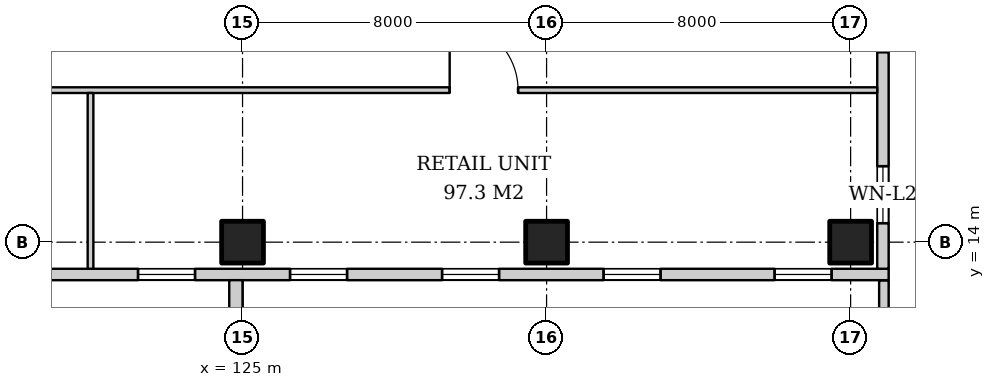
"""IFC4 building model, lengths in metres.
Left out: names, types, materials, properties, quantities, classifications, styles, units other than length and angle.
Written with IfcOpenShell. Run it as: python <this file> out.ifc"""

import sys

from ifc_helpers import new_model, si_unit, direction, frame, frame_2d, origin, origin_2d, place, context, subcontext, project, spatial, rectangle, extrude, element, fill, save


model = new_model("IFC4")
c1 = context("Model", 3, precision=1e-05, world=origin(), true_north=direction((0.0, 1.0)))
c2 = subcontext(c1, "Body", "Model", "MODEL_VIEW")
j1 = project(units=[si_unit("LENGTHUNIT", "METRE"), si_unit("PLANEANGLEUNIT", "RADIAN")], contexts=[c1])
p1 = place(None, origin())
s1 = spatial("IfcSite", under=j1, at=p1, CompositionType="ELEMENT")
p2 = place(p1, origin())
s2 = spatial("IfcBuilding", under=s1, at=p2, CompositionType="ELEMENT")
p3 = place(p2, frame((0.0, 0.0, 6.0)))
s3 = spatial("IfcBuildingStorey", under=s2, at=p3, CompositionType="ELEMENT", Elevation=6.0)
for number, where, z_axis, x_axis in (
    (1, (125.0, 14.0, 0.0), (0.0, 0.0, 1.0), (1.0, 0.0, 0.0)),
    (2, (133.0, 14.0, 0.0), (0.0, 0.0, 1.0), (1.0, 0.0, 0.0)),
    (3, (141.0, 14.0, 0.0), (0.0, 0.0, 1.0), (1.0, 0.0, 0.0)),
):
    element("IfcColumn", number, at=place(p3, frame(where, z_axis=z_axis, x_axis=x_axis)), inside=s3, PredefinedType="COLUMN", context=c2, shape_type="SweptSolid", body=[
        extrude(rectangle(XDim=1.1, YDim=1.1, at=origin_2d()), origin(), (0.0, 0.0, 1.0), 5.0),
    ])
p4 = place(p3, frame((92.0, 13.15, 0.0), z_axis=(0.0, 0.0, 1.0), x_axis=(1.0, 0.0, 0.0)))
e4 = element("IfcWall", 4, at=p4, inside=s3, PredefinedType="SOLIDWALL", context=c2, shape_type="SweptSolid", body=[
    extrude(rectangle(XDim=50.0, YDim=0.3, at=frame_2d((25.0, 0.0))), origin(), (0.0, 0.0, 1.0), 4.7),
])
p5 = place(p4, frame((1.5, 0.0, 0.9)))
e5 = element("IfcOpeningElement", 5, at=p5, cuts=e4, PredefinedType="OPENING", context=c2, shape_type="SweptSolid", body=[
    extrude(rectangle(XDim=1.5, YDim=3.2, at=frame_2d((0.75, 1.6))), frame((0.0, 0.16, 0.0), z_axis=(0.0, -1.0, 0.0), x_axis=(1.0, 0.0, 0.0)), (0.0, 0.0, 1.0), 0.32),
])
p6 = place(p4, frame((6.0, 0.0, 0.9)))
e6 = element("IfcOpeningElement", 6, at=p6, cuts=e4, PredefinedType="OPENING", context=c2, shape_type="SweptSolid", body=[
    extrude(rectangle(XDim=1.5, YDim=3.2, at=frame_2d((0.75, 1.6))), frame((0.0, 0.16, 0.0), z_axis=(0.0, -1.0, 0.0), x_axis=(1.0, 0.0, 0.0)), (0.0, 0.0, 1.0), 0.32),
])
p7 = place(p4, frame((10.25, 0.0, 0.9)))
e7 = element("IfcOpeningElement", 7, at=p7, cuts=e4, PredefinedType="OPENING", context=c2, shape_type="SweptSolid", body=[
    extrude(rectangle(XDim=1.5, YDim=3.2, at=frame_2d((0.75, 1.6))), frame((0.0, 0.16, 0.0), z_axis=(0.0, -1.0, 0.0), x_axis=(1.0, 0.0, 0.0)), (0.0, 0.0, 1.0), 0.32),
])
p8 = place(p4, frame((14.25, 0.0, 0.9)))
e8 = element("IfcOpeningElement", 8, at=p8, cuts=e4, PredefinedType="OPENING", context=c2, shape_type="SweptSolid", body=[
    extrude(rectangle(XDim=1.5, YDim=3.2, at=frame_2d((0.75, 1.6))), frame((0.0, 0.16, 0.0), z_axis=(0.0, -1.0, 0.0), x_axis=(1.0, 0.0, 0.0)), (0.0, 0.0, 1.0), 0.32),
])
p9 = place(p4, frame((18.25, 0.0, 0.9)))
e9 = element("IfcOpeningElement", 9, at=p9, cuts=e4, PredefinedType="OPENING", context=c2, shape_type="SweptSolid", body=[
    extrude(rectangle(XDim=1.5, YDim=3.2, at=frame_2d((0.75, 1.6))), frame((0.0, 0.16, 0.0), z_axis=(0.0, -1.0, 0.0), x_axis=(1.0, 0.0, 0.0)), (0.0, 0.0, 1.0), 0.32),
])
p10 = place(p4, frame((22.25, 0.0, 0.9)))
e10 = element("IfcOpeningElement", 10, at=p10, cuts=e4, PredefinedType="OPENING", context=c2, shape_type="SweptSolid", body=[
    extrude(rectangle(XDim=1.5, YDim=3.2, at=frame_2d((0.75, 1.6))), frame((0.0, 0.16, 0.0), z_axis=(0.0, -1.0, 0.0), x_axis=(1.0, 0.0, 0.0)), (0.0, 0.0, 1.0), 0.32),
])
p11 = place(p4, frame((26.1, 0.0, 0.0)))
e11 = element("IfcOpeningElement", 11, at=p11, cuts=e4, PredefinedType="OPENING", context=c2, shape_type="SweptSolid", body=[
    extrude(rectangle(XDim=1.8, YDim=2.4, at=frame_2d((0.9, 1.2))), frame((0.0, 0.16, 0.0), z_axis=(0.0, -1.0, 0.0), x_axis=(1.0, 0.0, 0.0)), (0.0, 0.0, 1.0), 0.32),
])
p12 = place(p4, frame((30.25, 0.0, 0.9)))
e12 = element("IfcOpeningElement", 12, at=p12, cuts=e4, PredefinedType="OPENING", context=c2, shape_type="SweptSolid", body=[
    extrude(rectangle(XDim=1.5, YDim=3.2, at=frame_2d((0.75, 1.6))), frame((0.0, 0.16, 0.0), z_axis=(0.0, -1.0, 0.0), x_axis=(1.0, 0.0, 0.0)), (0.0, 0.0, 1.0), 0.32),
])
p13 = place(p4, frame((34.25, 0.0, 0.9)))
e13 = element("IfcOpeningElement", 13, at=p13, cuts=e4, PredefinedType="OPENING", context=c2, shape_type="SweptSolid", body=[
    extrude(rectangle(XDim=1.5, YDim=3.2, at=frame_2d((0.75, 1.6))), frame((0.0, 0.16, 0.0), z_axis=(0.0, -1.0, 0.0), x_axis=(1.0, 0.0, 0.0)), (0.0, 0.0, 1.0), 0.32),
])
p14 = place(p4, frame((38.25, 0.0, 0.9)))
e14 = element("IfcOpeningElement", 14, at=p14, cuts=e4, PredefinedType="OPENING", context=c2, shape_type="SweptSolid", body=[
    extrude(rectangle(XDim=1.5, YDim=3.2, at=frame_2d((0.75, 1.6))), frame((0.0, 0.16, 0.0), z_axis=(0.0, -1.0, 0.0), x_axis=(1.0, 0.0, 0.0)), (0.0, 0.0, 1.0), 0.32),
])
p15 = place(p4, frame((42.5, 0.0, 0.9)))
e15 = element("IfcOpeningElement", 15, at=p15, cuts=e4, PredefinedType="OPENING", context=c2, shape_type="SweptSolid", body=[
    extrude(rectangle(XDim=1.5, YDim=3.2, at=frame_2d((0.75, 1.6))), frame((0.0, 0.16, 0.0), z_axis=(0.0, -1.0, 0.0), x_axis=(1.0, 0.0, 0.0)), (0.0, 0.0, 1.0), 0.32),
])
p16 = place(p4, frame((47.0, 0.0, 0.9)))
e16 = element("IfcOpeningElement", 16, at=p16, cuts=e4, PredefinedType="OPENING", context=c2, shape_type="SweptSolid", body=[
    extrude(rectangle(XDim=1.5, YDim=3.2, at=frame_2d((0.75, 1.6))), frame((0.0, 0.16, 0.0), z_axis=(0.0, -1.0, 0.0), x_axis=(1.0, 0.0, 0.0)), (0.0, 0.0, 1.0), 0.32),
])
p17 = place(p3, frame((141.85, 13.3, 0.0), z_axis=(0.0, 0.0, 1.0), x_axis=(0.0, 1.0, 0.0)))
e17 = element("IfcWall", 17, at=p17, inside=s3, PredefinedType="SOLIDWALL", context=c2, shape_type="SweptSolid", body=[
    extrude(rectangle(XDim=73.4, YDim=0.3, at=frame_2d((36.7, 0.0))), origin(), (0.0, 0.0, 1.0), 4.7),
])
p18 = place(p17, frame((1.2, 0.0, 0.9)))
e18 = element("IfcOpeningElement", 18, at=p18, cuts=e17, PredefinedType="OPENING", context=c2, shape_type="SweptSolid", body=[
    extrude(rectangle(XDim=1.5, YDim=3.2, at=frame_2d((0.75, 1.6))), frame((0.0, 0.16, 0.0), z_axis=(0.0, -1.0, 0.0), x_axis=(1.0, 0.0, 0.0)), (0.0, 0.0, 1.0), 0.32),
])
p19 = place(p17, frame((5.7, 0.0, 0.9)))
e19 = element("IfcOpeningElement", 19, at=p19, cuts=e17, PredefinedType="OPENING", context=c2, shape_type="SweptSolid", body=[
    extrude(rectangle(XDim=1.5, YDim=3.2, at=frame_2d((0.75, 1.6))), frame((0.0, 0.16, 0.0), z_axis=(0.0, -1.0, 0.0), x_axis=(1.0, 0.0, 0.0)), (0.0, 0.0, 1.0), 0.32),
])
p20 = place(p17, frame((9.95, 0.0, 0.9)))
e20 = element("IfcOpeningElement", 20, at=p20, cuts=e17, PredefinedType="OPENING", context=c2, shape_type="SweptSolid", body=[
    extrude(rectangle(XDim=1.5, YDim=3.2, at=frame_2d((0.75, 1.6))), frame((0.0, 0.16, 0.0), z_axis=(0.0, -1.0, 0.0), x_axis=(1.0, 0.0, 0.0)), (0.0, 0.0, 1.0), 0.32),
])
p21 = place(p17, frame((13.95, 0.0, 0.9)))
e21 = element("IfcOpeningElement", 21, at=p21, cuts=e17, PredefinedType="OPENING", context=c2, shape_type="SweptSolid", body=[
    extrude(rectangle(XDim=1.5, YDim=3.2, at=frame_2d((0.75, 1.6))), frame((0.0, 0.16, 0.0), z_axis=(0.0, -1.0, 0.0), x_axis=(1.0, 0.0, 0.0)), (0.0, 0.0, 1.0), 0.32),
])
p22 = place(p17, frame((17.95, 0.0, 0.9)))
e22 = element("IfcOpeningElement", 22, at=p22, cuts=e17, PredefinedType="OPENING", context=c2, shape_type="SweptSolid", body=[
    extrude(rectangle(XDim=1.5, YDim=3.2, at=frame_2d((0.75, 1.6))), frame((0.0, 0.16, 0.0), z_axis=(0.0, -1.0, 0.0), x_axis=(1.0, 0.0, 0.0)), (0.0, 0.0, 1.0), 0.32),
])
p23 = place(p17, frame((21.95, 0.0, 0.9)))
e23 = element("IfcOpeningElement", 23, at=p23, cuts=e17, PredefinedType="OPENING", context=c2, shape_type="SweptSolid", body=[
    extrude(rectangle(XDim=1.5, YDim=3.2, at=frame_2d((0.75, 1.6))), frame((0.0, 0.16, 0.0), z_axis=(0.0, -1.0, 0.0), x_axis=(1.0, 0.0, 0.0)), (0.0, 0.0, 1.0), 0.32),
])
p24 = place(p17, frame((25.95, 0.0, 0.9)))
e24 = element("IfcOpeningElement", 24, at=p24, cuts=e17, PredefinedType="OPENING", context=c2, shape_type="SweptSolid", body=[
    extrude(rectangle(XDim=1.5, YDim=3.2, at=frame_2d((0.75, 1.6))), frame((0.0, 0.16, 0.0), z_axis=(0.0, -1.0, 0.0), x_axis=(1.0, 0.0, 0.0)), (0.0, 0.0, 1.0), 0.32),
])
p25 = place(p17, frame((29.95, 0.0, 0.9)))
e25 = element("IfcOpeningElement", 25, at=p25, cuts=e17, PredefinedType="OPENING", context=c2, shape_type="SweptSolid", body=[
    extrude(rectangle(XDim=1.5, YDim=3.2, at=frame_2d((0.75, 1.6))), frame((0.0, 0.16, 0.0), z_axis=(0.0, -1.0, 0.0), x_axis=(1.0, 0.0, 0.0)), (0.0, 0.0, 1.0), 0.32),
])
p26 = place(p17, frame((33.95, 0.0, 0.9)))
e26 = element("IfcOpeningElement", 26, at=p26, cuts=e17, PredefinedType="OPENING", context=c2, shape_type="SweptSolid", body=[
    extrude(rectangle(XDim=1.5, YDim=3.2, at=frame_2d((0.75, 1.6))), frame((0.0, 0.16, 0.0), z_axis=(0.0, -1.0, 0.0), x_axis=(1.0, 0.0, 0.0)), (0.0, 0.0, 1.0), 0.32),
])
p27 = place(p17, frame((37.95, 0.0, 0.9)))
e27 = element("IfcOpeningElement", 27, at=p27, cuts=e17, PredefinedType="OPENING", context=c2, shape_type="SweptSolid", body=[
    extrude(rectangle(XDim=1.5, YDim=3.2, at=frame_2d((0.75, 1.6))), frame((0.0, 0.16, 0.0), z_axis=(0.0, -1.0, 0.0), x_axis=(1.0, 0.0, 0.0)), (0.0, 0.0, 1.0), 0.32),
])
p28 = place(p17, frame((41.95, 0.0, 0.9)))
e28 = element("IfcOpeningElement", 28, at=p28, cuts=e17, PredefinedType="OPENING", context=c2, shape_type="SweptSolid", body=[
    extrude(rectangle(XDim=1.5, YDim=3.2, at=frame_2d((0.75, 1.6))), frame((0.0, 0.16, 0.0), z_axis=(0.0, -1.0, 0.0), x_axis=(1.0, 0.0, 0.0)), (0.0, 0.0, 1.0), 0.32),
])
p29 = place(p17, frame((45.95, 0.0, 0.9)))
e29 = element("IfcOpeningElement", 29, at=p29, cuts=e17, PredefinedType="OPENING", context=c2, shape_type="SweptSolid", body=[
    extrude(rectangle(XDim=1.5, YDim=3.2, at=frame_2d((0.75, 1.6))), frame((0.0, 0.16, 0.0), z_axis=(0.0, -1.0, 0.0), x_axis=(1.0, 0.0, 0.0)), (0.0, 0.0, 1.0), 0.32),
])
p30 = place(p17, frame((49.95, 0.0, 0.9)))
e30 = element("IfcOpeningElement", 30, at=p30, cuts=e17, PredefinedType="OPENING", context=c2, shape_type="SweptSolid", body=[
    extrude(rectangle(XDim=1.5, YDim=3.2, at=frame_2d((0.75, 1.6))), frame((0.0, 0.16, 0.0), z_axis=(0.0, -1.0, 0.0), x_axis=(1.0, 0.0, 0.0)), (0.0, 0.0, 1.0), 0.32),
])
p31 = place(p17, frame((53.95, 0.0, 0.9)))
e31 = element("IfcOpeningElement", 31, at=p31, cuts=e17, PredefinedType="OPENING", context=c2, shape_type="SweptSolid", body=[
    extrude(rectangle(XDim=1.5, YDim=3.2, at=frame_2d((0.75, 1.6))), frame((0.0, 0.16, 0.0), z_axis=(0.0, -1.0, 0.0), x_axis=(1.0, 0.0, 0.0)), (0.0, 0.0, 1.0), 0.32),
])
p32 = place(p17, frame((57.95, 0.0, 0.9)))
e32 = element("IfcOpeningElement", 32, at=p32, cuts=e17, PredefinedType="OPENING", context=c2, shape_type="SweptSolid", body=[
    extrude(rectangle(XDim=1.5, YDim=3.2, at=frame_2d((0.75, 1.6))), frame((0.0, 0.16, 0.0), z_axis=(0.0, -1.0, 0.0), x_axis=(1.0, 0.0, 0.0)), (0.0, 0.0, 1.0), 0.32),
])
p33 = place(p17, frame((61.95, 0.0, 0.9)))
e33 = element("IfcOpeningElement", 33, at=p33, cuts=e17, PredefinedType="OPENING", context=c2, shape_type="SweptSolid", body=[
    extrude(rectangle(XDim=1.5, YDim=3.2, at=frame_2d((0.75, 1.6))), frame((0.0, 0.16, 0.0), z_axis=(0.0, -1.0, 0.0), x_axis=(1.0, 0.0, 0.0)), (0.0, 0.0, 1.0), 0.32),
])
p34 = place(p17, frame((66.2, 0.0, 0.9)))
e34 = element("IfcOpeningElement", 34, at=p34, cuts=e17, PredefinedType="OPENING", context=c2, shape_type="SweptSolid", body=[
    extrude(rectangle(XDim=1.5, YDim=3.2, at=frame_2d((0.75, 1.6))), frame((0.0, 0.16, 0.0), z_axis=(0.0, -1.0, 0.0), x_axis=(1.0, 0.0, 0.0)), (0.0, 0.0, 1.0), 0.32),
])
p35 = place(p17, frame((70.7, 0.0, 0.9)))
e35 = element("IfcOpeningElement", 35, at=p35, cuts=e17, PredefinedType="OPENING", context=c2, shape_type="SweptSolid", body=[
    extrude(rectangle(XDim=1.5, YDim=3.2, at=frame_2d((0.75, 1.6))), frame((0.0, 0.16, 0.0), z_axis=(0.0, -1.0, 0.0), x_axis=(1.0, 0.0, 0.0)), (0.0, 0.0, 1.0), 0.32),
])
p36 = place(p3, frame((141.875, 5.25, 0.0), z_axis=(0.0, 0.0, 1.0), x_axis=(0.0, 1.0, 0.0)))
e36 = element("IfcWall", 36, at=p36, inside=s3, PredefinedType="PARAPET", context=c2, shape_type="SweptSolid", body=[
    extrude(rectangle(XDim=7.74, YDim=0.25, at=frame_2d((3.87, 0.0))), origin(), (0.0, 0.0, 1.0), 1.1),
])
p37 = place(p3, frame((124.825, 5.0, 0.0), z_axis=(0.0, 0.0, 1.0), x_axis=(0.0, 1.0, 0.0)))
e37 = element("IfcWall", 37, at=p37, inside=s3, PredefinedType="PARAPET", context=c2, shape_type="SweptSolid", body=[
    extrude(rectangle(XDim=8.0, YDim=0.35, at=frame_2d((4.0, 0.0))), origin(), (0.0, 0.0, 1.0), 1.1),
])
p38 = place(p3, frame((92.3, 18.0, 0.0), z_axis=(0.0, 0.0, 1.0), x_axis=(1.0, 0.0, 0.0)))
e38 = element("IfcWall", 38, at=p38, inside=s3, PredefinedType="PARTITIONING", context=c2, shape_type="SweptSolid", body=[
    extrude(rectangle(XDim=49.4, YDim=0.15, at=frame_2d((24.7, 0.0))), origin(), (0.0, 0.0, 1.0), 3.2),
])
p39 = place(p38, frame((5.45, 0.0, 0.0)))
e39 = element("IfcOpeningElement", 39, at=p39, cuts=e38, PredefinedType="OPENING", context=c2, shape_type="SweptSolid", body=[
    extrude(rectangle(XDim=1.8, YDim=2.4, at=frame_2d((0.9, 1.2))), frame((0.0, 0.085, 0.0), z_axis=(0.0, -1.0, 0.0), x_axis=(1.0, 0.0, 0.0)), (0.0, 0.0, 1.0), 0.17),
])
p40 = place(p38, frame((19.8, 0.0, 0.0)))
e40 = element("IfcOpeningElement", 40, at=p40, cuts=e38, PredefinedType="OPENING", context=c2, shape_type="SweptSolid", body=[
    extrude(rectangle(XDim=1.8, YDim=2.4, at=frame_2d((0.9, 1.2))), frame((0.0, 0.085, 0.0), z_axis=(0.0, -1.0, 0.0), x_axis=(1.0, 0.0, 0.0)), (0.0, 0.0, 1.0), 0.17),
])
p41 = place(p38, frame((38.15, 0.0, 0.0)))
e41 = element("IfcOpeningElement", 41, at=p41, cuts=e38, PredefinedType="OPENING", context=c2, shape_type="SweptSolid", body=[
    extrude(rectangle(XDim=1.8, YDim=2.4, at=frame_2d((0.9, 1.2))), frame((0.0, 0.085, 0.0), z_axis=(0.0, -1.0, 0.0), x_axis=(1.0, 0.0, 0.0)), (0.0, 0.0, 1.0), 0.17),
])
p42 = place(p3, frame((121.0, 17.925, 0.0), z_axis=(0.0, 0.0, 1.0), x_axis=(0.0, -1.0, 0.0)))
e42 = element("IfcWall", 42, at=p42, inside=s3, PredefinedType="PARTITIONING", context=c2, shape_type="SweptSolid", body=[
    extrude(rectangle(XDim=4.625, YDim=0.15, at=frame_2d((2.312, 0.0))), origin(), (0.0, 0.0, 1.0), 3.2),
])
p43 = place(p12, origin())
e43 = element("IfcWindow", 43, at=p43, inside=s3, PartitioningType="SINGLE_PANEL", PredefinedType="WINDOW", context=c2, shape_type="SweptSolid", body=[
    extrude(rectangle(XDim=1.5, YDim=3.2, at=frame_2d((0.75, 1.6))), frame((0.0, 0.03, 0.0), z_axis=(0.0, -1.0, 0.0), x_axis=(1.0, 0.0, 0.0)), (0.0, 0.0, 1.0), 0.06),
])
fill(e12, e43)
p44 = place(p13, origin())
e44 = element("IfcWindow", 44, at=p44, inside=s3, PartitioningType="SINGLE_PANEL", PredefinedType="WINDOW", context=c2, shape_type="SweptSolid", body=[
    extrude(rectangle(XDim=1.5, YDim=3.2, at=frame_2d((0.75, 1.6))), frame((0.0, 0.03, 0.0), z_axis=(0.0, -1.0, 0.0), x_axis=(1.0, 0.0, 0.0)), (0.0, 0.0, 1.0), 0.06),
])
fill(e13, e44)
p45 = place(p14, origin())
e45 = element("IfcWindow", 45, at=p45, inside=s3, PartitioningType="SINGLE_PANEL", PredefinedType="WINDOW", context=c2, shape_type="SweptSolid", body=[
    extrude(rectangle(XDim=1.5, YDim=3.2, at=frame_2d((0.75, 1.6))), frame((0.0, 0.03, 0.0), z_axis=(0.0, -1.0, 0.0), x_axis=(1.0, 0.0, 0.0)), (0.0, 0.0, 1.0), 0.06),
])
fill(e14, e45)
p46 = place(p15, origin())
e46 = element("IfcWindow", 46, at=p46, inside=s3, PartitioningType="SINGLE_PANEL", PredefinedType="WINDOW", context=c2, shape_type="SweptSolid", body=[
    extrude(rectangle(XDim=1.5, YDim=3.2, at=frame_2d((0.75, 1.6))), frame((0.0, 0.03, 0.0), z_axis=(0.0, -1.0, 0.0), x_axis=(1.0, 0.0, 0.0)), (0.0, 0.0, 1.0), 0.06),
])
fill(e15, e46)
p47 = place(p16, origin())
e47 = element("IfcWindow", 47, at=p47, inside=s3, PartitioningType="SINGLE_PANEL", PredefinedType="WINDOW", context=c2, shape_type="SweptSolid", body=[
    extrude(rectangle(XDim=1.5, YDim=3.2, at=frame_2d((0.75, 1.6))), frame((0.0, 0.03, 0.0), z_axis=(0.0, -1.0, 0.0), x_axis=(1.0, 0.0, 0.0)), (0.0, 0.0, 1.0), 0.06),
])
fill(e16, e47)
p48 = place(p18, origin())
e48 = element("IfcWindow", 48, at=p48, inside=s3, PartitioningType="SINGLE_PANEL", PredefinedType="WINDOW", context=c2, shape_type="SweptSolid", body=[
    extrude(rectangle(XDim=1.5, YDim=3.2, at=frame_2d((0.75, 1.6))), frame((0.0, 0.03, 0.0), z_axis=(0.0, -1.0, 0.0), x_axis=(1.0, 0.0, 0.0)), (0.0, 0.0, 1.0), 0.06),
])
fill(e18, e48)
p49 = place(p41, origin())
e49 = element("IfcDoor", 49, at=p49, inside=s3, OperationType="DOUBLE_DOOR_SINGLE_SWING", PredefinedType="DOOR", context=c2, shape_type="SweptSolid", body=[
    extrude(rectangle(XDim=1.8, YDim=2.4, at=frame_2d((0.9, 1.2))), frame((0.0, 0.025, 0.0), z_axis=(0.0, -1.0, 0.0), x_axis=(1.0, 0.0, 0.0)), (0.0, 0.0, 1.0), 0.05),
])
fill(e41, e49)
save(model, sys.argv[1])
